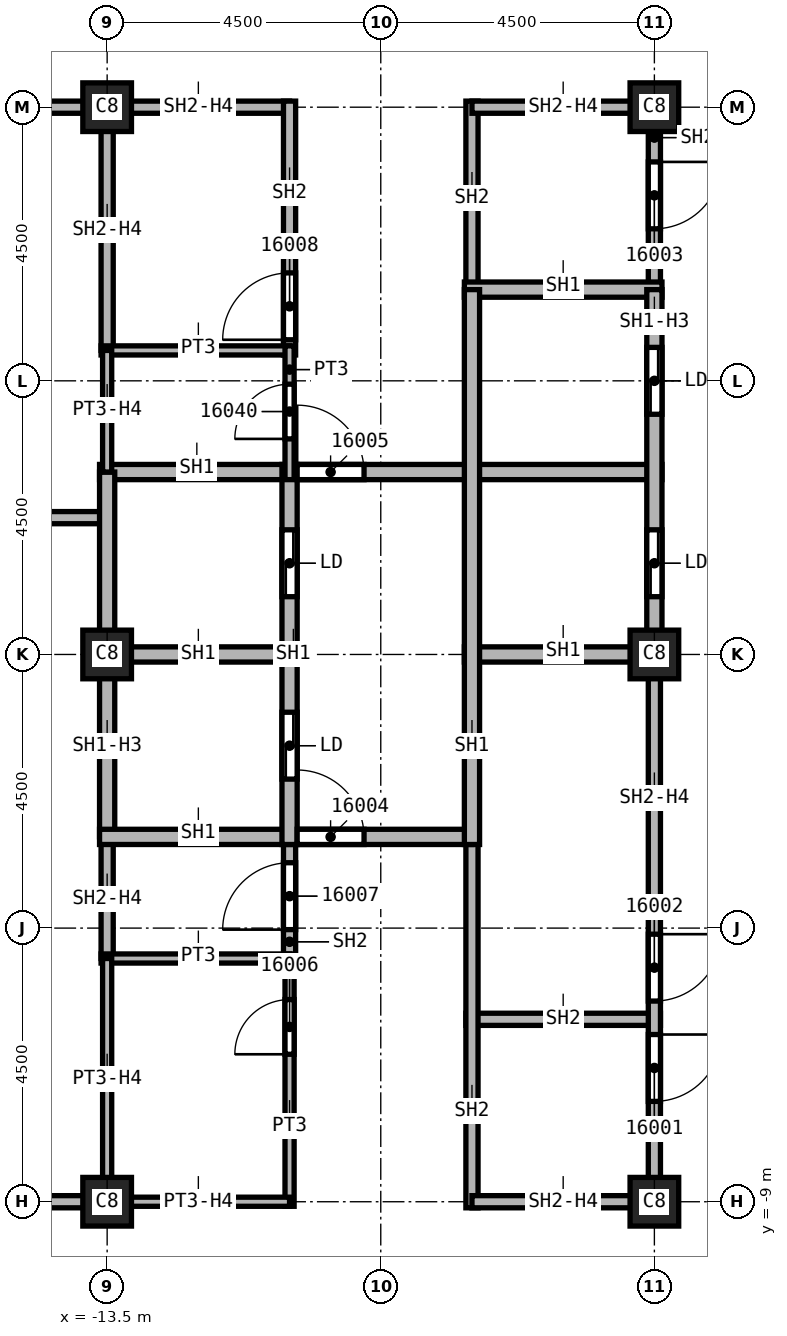
"""IFC4 building model, lengths in metres.
Left out: names, types, materials, properties, quantities, classifications, styles, units other than length and angle.
Written with IfcOpenShell. Run it as: python <this file> out.ifc"""

import sys

from ifc_helpers import new_model, si_unit, direction, frame, frame_2d, origin, origin_2d, place, context, subcontext, project, spatial, rectangle, extrude, element, fill, save


model = new_model("IFC4")
c1 = context("Model", 3, precision=1e-05, world=origin(), true_north=direction((0.0, 1.0)))
c2 = subcontext(c1, "Body", "Model", "MODEL_VIEW")
j1 = project(units=[si_unit("LENGTHUNIT", "METRE"), si_unit("PLANEANGLEUNIT", "RADIAN")], contexts=[c1])
p1 = place(None, origin())
s1 = spatial("IfcSite", under=j1, at=p1, CompositionType="ELEMENT")
p2 = place(p1, origin())
s2 = spatial("IfcBuilding", under=s1, at=p2, CompositionType="ELEMENT")
p3 = place(p2, frame((0.0, 0.0, 246.0)))
s3 = spatial("IfcBuildingStorey", under=s2, at=p3, CompositionType="ELEMENT", Elevation=246.0)
for number, where, z_axis, x_axis in (
    (1, (-4.5, 0.0, 0.0), (0.0, 0.0, 1.0), (1.0, 0.0, 0.0)),
    (2, (-4.5, 9.0, 0.0), (0.0, 0.0, 1.0), (1.0, 0.0, 0.0)),
    (3, (-4.5, -9.0, 0.0), (0.0, 0.0, 1.0), (1.0, 0.0, 0.0)),
    (4, (-13.5, 0.0, 0.0), (0.0, 0.0, 1.0), (1.0, 0.0, 0.0)),
    (5, (-13.5, 9.0, 0.0), (0.0, 0.0, 1.0), (1.0, 0.0, 0.0)),
    (6, (-13.5, -9.0, 0.0), (0.0, 0.0, 1.0), (1.0, 0.0, 0.0)),
):
    element("IfcColumn", number, at=place(p3, frame(where, z_axis=z_axis, x_axis=x_axis)), inside=s3, PredefinedType="COLUMN", context=c2, shape_type="SweptSolid", body=[
        extrude(rectangle(XDim=0.8, YDim=0.8, at=origin_2d()), origin(), (0.0, 0.0, 1.0), 3.72),
    ])
for number, where, z_axis, x_axis in (
    (7, (-18.0, -9.0, 0.0), (0.0, 0.0, 1.0), (1.0, 0.0, 0.0)),
    (8, (-18.0, 2.25, 0.0), (0.0, 0.0, 1.0), (1.0, 0.0, 0.0)),
    (9, (-13.5, 9.0, 0.0), (0.0, 0.0, 1.0), (-1.0, 0.0, 0.0)),
):
    element("IfcWall", number, at=place(p3, frame(where, z_axis=z_axis, x_axis=x_axis)), inside=s3, PredefinedType="PARTITIONING", context=c2, shape_type="SweptSolid", body=[
        extrude(rectangle(XDim=4.5, YDim=0.2, at=frame_2d((2.25, 0.0))), origin(), (0.0, 0.0, 1.0), 3.72),
    ])
p4 = place(p3, frame((-13.6, 9.0, 0.0), z_axis=(0.0, 0.0, 1.0), x_axis=(1.0, 0.0, 0.0)))
e10 = element("IfcWall", 10, at=p4, inside=s3, PredefinedType="SOLIDWALL", context=c2, shape_type="SweptSolid", body=[
    extrude(rectangle(XDim=3.1, YDim=0.2, at=frame_2d((1.55, 0.0))), origin(), (0.0, 0.0, 1.0), 3.042),
])
p5 = place(p3, frame((-13.5, -5.0, 0.0), z_axis=(0.0, 0.0, 1.0), x_axis=(0.0, 1.0, 0.0)))
e11 = element("IfcWall", 11, at=p5, inside=s3, PredefinedType="SOLIDWALL", context=c2, shape_type="SweptSolid", body=[
    extrude(rectangle(XDim=2.0, YDim=0.2, at=frame_2d((1.0, 0.0))), origin(), (0.0, 0.0, 1.0), 3.042),
])
p6 = place(p3, frame((-13.5, 5.0, 0.0), z_axis=(0.0, 0.0, 1.0), x_axis=(0.0, 1.0, 0.0)))
e12 = element("IfcWall", 12, at=p6, inside=s3, PredefinedType="SOLIDWALL", context=c2, shape_type="SweptSolid", body=[
    extrude(rectangle(XDim=4.1, YDim=0.2, at=frame_2d((2.05, 0.0))), origin(), (0.0, 0.0, 1.0), 3.042),
])
p7 = place(p3, frame((-10.5, -5.075, 0.0), z_axis=(0.0, 0.0, 1.0), x_axis=(0.0, 1.0, 0.0)))
e13 = element("IfcWall", 13, at=p7, inside=s3, PredefinedType="SOLIDWALL", context=c2, shape_type="SweptSolid", body=[
    extrude(rectangle(XDim=2.2, YDim=0.2, at=frame_2d((1.1, 0.0))), origin(), (0.0, 0.0, 1.0), 3.72),
])
p8 = place(p7, frame((0.55, 0.0, 0.0)))
e14 = element("IfcOpeningElement", 14, at=p8, cuts=e13, PredefinedType="OPENING", context=c2, shape_type="SweptSolid", body=[
    extrude(rectangle(XDim=1.1, YDim=2.1, at=frame_2d((0.55, 1.05))), frame((0.0, 0.1, 0.0), z_axis=(0.0, -1.0, 0.0), x_axis=(1.0, 0.0, 0.0)), (0.0, 0.0, 1.0), 0.2),
])
p9 = place(p3, frame((-10.5, 4.925, 0.0), z_axis=(0.0, 0.0, 1.0), x_axis=(0.0, 1.0, 0.0)))
e15 = element("IfcWall", 15, at=p9, inside=s3, PredefinedType="SOLIDWALL", context=c2, shape_type="SweptSolid", body=[
    extrude(rectangle(XDim=4.175, YDim=0.2, at=frame_2d((2.087, 0.0))), origin(), (0.0, 0.0, 1.0), 3.72),
])
p10 = place(p9, frame((0.25, 0.0, 0.0)))
e16 = element("IfcOpeningElement", 16, at=p10, cuts=e15, PredefinedType="OPENING", context=c2, shape_type="SweptSolid", body=[
    extrude(rectangle(XDim=1.1, YDim=2.1, at=frame_2d((0.55, 1.05))), frame((0.0, 0.1, 0.0), z_axis=(0.0, -1.0, 0.0), x_axis=(1.0, 0.0, 0.0)), (0.0, 0.0, 1.0), 0.2),
])
p11 = place(p3, frame((-7.6, -6.0, 0.0), z_axis=(0.0, 0.0, 1.0), x_axis=(1.0, 0.0, 0.0)))
e17 = element("IfcWall", 17, at=p11, inside=s3, PredefinedType="SOLIDWALL", context=c2, shape_type="SweptSolid", body=[
    extrude(rectangle(XDim=3.2, YDim=0.2, at=frame_2d((1.6, 0.0))), origin(), (0.0, 0.0, 1.0), 3.72),
])
p12 = place(p3, frame((-7.5, -9.1, 0.0), z_axis=(0.0, 0.0, 1.0), x_axis=(0.0, 1.0, 0.0)))
e18 = element("IfcWall", 18, at=p12, inside=s3, PredefinedType="SOLIDWALL", context=c2, shape_type="SweptSolid", body=[
    extrude(rectangle(XDim=6.225, YDim=0.2, at=frame_2d((3.113, 0.0))), origin(), (0.0, 0.0, 1.0), 3.72),
])
p13 = place(p3, frame((-7.5, 6.0, 0.0), z_axis=(0.0, 0.0, 1.0), x_axis=(0.0, 1.0, 0.0)))
e19 = element("IfcWall", 19, at=p13, inside=s3, PredefinedType="SOLIDWALL", context=c2, shape_type="SweptSolid", body=[
    extrude(rectangle(XDim=3.1, YDim=0.2, at=frame_2d((1.55, 0.0))), origin(), (0.0, 0.0, 1.0), 3.72),
])
for number, where, z_axis, x_axis in (
    (20, (-7.5, 9.0, 0.0), (0.0, 0.0, 1.0), (1.0, 0.0, 0.0)),
    (21, (-4.5, -9.0, 0.0), (0.0, 0.0, 1.0), (-1.0, 0.0, 0.0)),
):
    element("IfcWall", number, at=place(p3, frame(where, z_axis=z_axis, x_axis=x_axis)), inside=s3, PredefinedType="SOLIDWALL", context=c2, shape_type="SweptSolid", body=[
        extrude(rectangle(XDim=3.0, YDim=0.2, at=frame_2d((1.5, 0.0))), origin(), (0.0, 0.0, 1.0), 3.042),
    ])
p14 = place(p3, frame((-4.5, 0.0, 0.0), z_axis=(0.0, 0.0, 1.0), x_axis=(0.0, -1.0, 0.0)))
e22 = element("IfcWall", 22, at=p14, inside=s3, PredefinedType="SOLIDWALL", context=c2, shape_type="SweptSolid", body=[
    extrude(rectangle(XDim=9.1, YDim=0.2, at=frame_2d((4.55, 0.0))), origin(), (0.0, 0.0, 1.0), 3.042),
])
p15 = place(p14, frame((6.25, 0.0, 0.0)))
e23 = element("IfcOpeningElement", 23, at=p15, cuts=e22, PredefinedType="OPENING", context=c2, shape_type="SweptSolid", body=[
    extrude(rectangle(XDim=1.1, YDim=2.1, at=frame_2d((0.55, 1.05))), frame((0.0, 0.1, 0.0), z_axis=(0.0, -1.0, 0.0), x_axis=(1.0, 0.0, 0.0)), (0.0, 0.0, 1.0), 0.2),
])
p16 = place(p14, frame((4.6, 0.0, 0.0)))
e24 = element("IfcOpeningElement", 24, at=p16, cuts=e22, PredefinedType="OPENING", context=c2, shape_type="SweptSolid", body=[
    extrude(rectangle(XDim=1.1, YDim=2.1, at=frame_2d((0.55, 1.05))), frame((0.0, 0.1, 0.0), z_axis=(0.0, -1.0, 0.0), x_axis=(1.0, 0.0, 0.0)), (0.0, 0.0, 1.0), 0.2),
])
p17 = place(p3, frame((-4.5, 9.1, 0.0), z_axis=(0.0, 0.0, 1.0), x_axis=(0.0, -1.0, 0.0)))
e25 = element("IfcWall", 25, at=p17, inside=s3, PredefinedType="SOLIDWALL", context=c2, shape_type="SweptSolid", body=[
    extrude(rectangle(XDim=3.1, YDim=0.2, at=frame_2d((1.55, 0.0))), origin(), (0.0, 0.0, 1.0), 3.042),
])
p18 = place(p17, frame((1.0, 0.0, 0.0)))
e26 = element("IfcOpeningElement", 26, at=p18, cuts=e25, PredefinedType="OPENING", context=c2, shape_type="SweptSolid", body=[
    extrude(rectangle(XDim=1.1, YDim=2.1, at=frame_2d((0.55, 1.05))), frame((0.0, 0.1, 0.0), z_axis=(0.0, -1.0, 0.0), x_axis=(1.0, 0.0, 0.0)), (0.0, 0.0, 1.0), 0.2),
])
p19 = place(p3, frame((-13.625, 0.0, 0.0), z_axis=(0.0, 0.0, 1.0), x_axis=(1.0, 0.0, 0.0)))
e27 = element("IfcWall", 27, at=p19, inside=s3, PredefinedType="SOLIDWALL", context=c2, shape_type="SweptSolid", body=[
    extrude(rectangle(XDim=3.125, YDim=0.25, at=frame_2d((1.562, 0.0))), origin(), (0.0, 0.0, 1.0), 3.72),
])
p20 = place(p3, frame((-13.625, 3.0, 0.0), z_axis=(0.0, 0.0, 1.0), x_axis=(1.0, 0.0, 0.0)))
e28 = element("IfcWall", 28, at=p20, inside=s3, PredefinedType="SOLIDWALL", context=c2, shape_type="SweptSolid", body=[
    extrude(rectangle(XDim=9.25, YDim=0.25, at=frame_2d((4.625, 0.0))), origin(), (0.0, 0.0, 1.0), 3.72),
])
p21 = place(p20, frame((3.25, 0.0, 0.0)))
e29 = element("IfcOpeningElement", 29, at=p21, cuts=e28, PredefinedType="OPENING", context=c2, shape_type="SweptSolid", body=[
    extrude(rectangle(XDim=1.1, YDim=2.1, at=frame_2d((0.55, 1.05))), frame((0.0, 0.125, 0.0), z_axis=(0.0, -1.0, 0.0), x_axis=(1.0, 0.0, 0.0)), (0.0, 0.0, 1.0), 0.25),
])
p22 = place(p3, frame((-13.5, -3.0, 0.0), z_axis=(0.0, 0.0, 1.0), x_axis=(0.0, 1.0, 0.0)))
e30 = element("IfcWall", 30, at=p22, inside=s3, PredefinedType="SOLIDWALL", context=c2, shape_type="SweptSolid", body=[
    extrude(rectangle(XDim=6.0, YDim=0.25, at=frame_2d((3.0, 0.0))), origin(), (0.0, 0.0, 1.0), 3.042),
])
p23 = place(p3, frame((-13.625, -3.0, 0.0), z_axis=(0.0, 0.0, 1.0), x_axis=(1.0, 0.0, 0.0)))
e31 = element("IfcWall", 31, at=p23, inside=s3, PredefinedType="SOLIDWALL", context=c2, shape_type="SweptSolid", body=[
    extrude(rectangle(XDim=6.125, YDim=0.25, at=frame_2d((3.062, 0.0))), origin(), (0.0, 0.0, 1.0), 3.72),
])
p24 = place(p23, frame((3.25, 0.0, 0.0)))
e32 = element("IfcOpeningElement", 32, at=p24, cuts=e31, PredefinedType="OPENING", context=c2, shape_type="SweptSolid", body=[
    extrude(rectangle(XDim=1.1, YDim=2.1, at=frame_2d((0.55, 1.05))), frame((0.0, 0.125, 0.0), z_axis=(0.0, -1.0, 0.0), x_axis=(1.0, 0.0, 0.0)), (0.0, 0.0, 1.0), 0.25),
])
p25 = place(p3, frame((-10.5, -3.125, 0.0), z_axis=(0.0, 0.0, 1.0), x_axis=(0.0, 1.0, 0.0)))
e33 = element("IfcWall", 33, at=p25, inside=s3, PredefinedType="SOLIDWALL", context=c2, shape_type="SweptSolid", body=[
    extrude(rectangle(XDim=6.25, YDim=0.25, at=frame_2d((3.125, 0.0))), origin(), (0.0, 0.0, 1.0), 3.72),
])
p26 = place(p25, frame((1.075, 0.0, 0.0)))
e34 = element("IfcOpeningElement", 34, at=p26, cuts=e33, PredefinedType="OPENING", context=c2, shape_type="SweptSolid", body=[
    extrude(rectangle(XDim=1.1, YDim=2.1, at=frame_2d((0.55, 1.05))), frame((0.0, 0.125, 0.0), z_axis=(0.0, -1.0, 0.0), x_axis=(1.0, 0.0, 0.0)), (0.0, 0.0, 1.0), 0.25),
])
p27 = place(p25, frame((4.075, 0.0, 0.0)))
e35 = element("IfcOpeningElement", 35, at=p27, cuts=e33, PredefinedType="OPENING", context=c2, shape_type="SweptSolid", body=[
    extrude(rectangle(XDim=1.1, YDim=2.1, at=frame_2d((0.55, 1.05))), frame((0.0, 0.125, 0.0), z_axis=(0.0, -1.0, 0.0), x_axis=(1.0, 0.0, 0.0)), (0.0, 0.0, 1.0), 0.25),
])
for number, where, z_axis, x_axis in (
    (36, (-7.625, 0.0, 0.0), (0.0, 0.0, 1.0), (1.0, 0.0, 0.0)),
    (37, (-7.625, 6.0, 0.0), (0.0, 0.0, 1.0), (1.0, 0.0, 0.0)),
):
    element("IfcWall", number, at=place(p3, frame(where, z_axis=z_axis, x_axis=x_axis)), inside=s3, PredefinedType="SOLIDWALL", context=c2, shape_type="SweptSolid", body=[
        extrude(rectangle(XDim=3.25, YDim=0.25, at=frame_2d((1.625, 0.0))), origin(), (0.0, 0.0, 1.0), 3.72),
    ])
p28 = place(p3, frame((-7.5, -3.125, 0.0), z_axis=(0.0, 0.0, 1.0), x_axis=(0.0, 1.0, 0.0)))
e38 = element("IfcWall", 38, at=p28, inside=s3, PredefinedType="SOLIDWALL", context=c2, shape_type="SweptSolid", body=[
    extrude(rectangle(XDim=9.125, YDim=0.25, at=frame_2d((4.562, 0.0))), origin(), (0.0, 0.0, 1.0), 3.72),
])
p29 = place(p3, frame((-4.5, 6.0, 0.0), z_axis=(0.0, 0.0, 1.0), x_axis=(0.0, -1.0, 0.0)))
e39 = element("IfcWall", 39, at=p29, inside=s3, PredefinedType="SOLIDWALL", context=c2, shape_type="SweptSolid", body=[
    extrude(rectangle(XDim=6.0, YDim=0.25, at=frame_2d((3.0, 0.0))), origin(), (0.0, 0.0, 1.0), 3.042),
])
p30 = place(p29, frame((3.95, 0.0, 0.0)))
e40 = element("IfcOpeningElement", 40, at=p30, cuts=e39, PredefinedType="OPENING", context=c2, shape_type="SweptSolid", body=[
    extrude(rectangle(XDim=1.1, YDim=2.1, at=frame_2d((0.55, 1.05))), frame((0.0, 0.125, 0.0), z_axis=(0.0, -1.0, 0.0), x_axis=(1.0, 0.0, 0.0)), (0.0, 0.0, 1.0), 0.25),
])
p31 = place(p29, frame((0.95, 0.0, 0.0)))
e41 = element("IfcOpeningElement", 41, at=p31, cuts=e39, PredefinedType="OPENING", context=c2, shape_type="SweptSolid", body=[
    extrude(rectangle(XDim=1.1, YDim=2.1, at=frame_2d((0.55, 1.05))), frame((0.0, 0.125, 0.0), z_axis=(0.0, -1.0, 0.0), x_axis=(1.0, 0.0, 0.0)), (0.0, 0.0, 1.0), 0.25),
])
for number, where, z_axis, x_axis in (
    (42, (-13.6, -5.0, 0.0), (0.0, 0.0, 1.0), (1.0, 0.0, 0.0)),
    (43, (-13.6, 5.0, 0.0), (0.0, 0.0, 1.0), (1.0, 0.0, 0.0)),
):
    element("IfcWall", number, at=place(p3, frame(where, z_axis=z_axis, x_axis=x_axis)), inside=s3, PredefinedType="PARTITIONING", context=c2, shape_type="SweptSolid", body=[
        extrude(rectangle(XDim=3.1, YDim=0.15, at=frame_2d((1.55, 0.0))), origin(), (0.0, 0.0, 1.0), 3.72),
    ])
p32 = place(p3, frame((-13.5, -9.1, 0.0), z_axis=(0.0, 0.0, 1.0), x_axis=(0.0, 1.0, 0.0)))
e44 = element("IfcWall", 44, at=p32, inside=s3, PredefinedType="PARTITIONING", context=c2, shape_type="SweptSolid", body=[
    extrude(rectangle(XDim=4.1, YDim=0.15, at=frame_2d((2.05, 0.0))), origin(), (0.0, 0.0, 1.0), 3.042),
])
p33 = place(p3, frame((-13.5, 3.0, 0.0), z_axis=(0.0, 0.0, 1.0), x_axis=(0.0, 1.0, 0.0)))
e45 = element("IfcWall", 45, at=p33, inside=s3, PredefinedType="PARTITIONING", context=c2, shape_type="SweptSolid", body=[
    extrude(rectangle(XDim=2.0, YDim=0.15, at=frame_2d((1.0, 0.0))), origin(), (0.0, 0.0, 1.0), 3.042),
])
p34 = place(p3, frame((-10.5, -9.075, 0.0), z_axis=(0.0, 0.0, 1.0), x_axis=(0.0, 1.0, 0.0)))
e46 = element("IfcWall", 46, at=p34, inside=s3, PredefinedType="PARTITIONING", context=c2, shape_type="SweptSolid", body=[
    extrude(rectangle(XDim=4.15, YDim=0.15, at=frame_2d((2.075, 0.0))), origin(), (0.0, 0.0, 1.0), 3.72),
])
p35 = place(p34, frame((2.5, 0.0, 0.0)))
e47 = element("IfcOpeningElement", 47, at=p35, cuts=e46, PredefinedType="OPENING", context=c2, shape_type="SweptSolid", body=[
    extrude(rectangle(XDim=0.9, YDim=2.1, at=frame_2d((0.45, 1.05))), frame((0.0, 0.075, 0.0), z_axis=(0.0, -1.0, 0.0), x_axis=(1.0, 0.0, 0.0)), (0.0, 0.0, 1.0), 0.15),
])
p36 = place(p3, frame((-10.5, -9.0, 0.0), z_axis=(0.0, 0.0, 1.0), x_axis=(-1.0, 0.0, 0.0)))
e48 = element("IfcWall", 48, at=p36, inside=s3, PredefinedType="PARTITIONING", context=c2, shape_type="SweptSolid", body=[
    extrude(rectangle(XDim=3.075, YDim=0.15, at=frame_2d((1.538, 0.0))), origin(), (0.0, 0.0, 1.0), 3.042),
])
p37 = place(p3, frame((-10.5, 2.875, 0.0), z_axis=(0.0, 0.0, 1.0), x_axis=(0.0, 1.0, 0.0)))
e49 = element("IfcWall", 49, at=p37, inside=s3, PredefinedType="PARTITIONING", context=c2, shape_type="SweptSolid", body=[
    extrude(rectangle(XDim=2.2, YDim=0.15, at=frame_2d((1.1, 0.0))), origin(), (0.0, 0.0, 1.0), 3.72),
])
p38 = place(p37, frame((0.67, 0.0, 0.0)))
e50 = element("IfcOpeningElement", 50, at=p38, cuts=e49, PredefinedType="OPENING", context=c2, shape_type="SweptSolid", body=[
    extrude(rectangle(XDim=0.9, YDim=2.1, at=frame_2d((0.45, 1.05))), frame((0.0, 0.075, 0.0), z_axis=(0.0, -1.0, 0.0), x_axis=(1.0, 0.0, 0.0)), (0.0, 0.0, 1.0), 0.15),
])
p39 = place(p15, origin())
e51 = element("IfcDoor", 51, at=p39, inside=s3, OperationType="SINGLE_SWING_RIGHT", PredefinedType="DOOR", context=c2, shape_type="SweptSolid", body=[
    extrude(rectangle(XDim=1.1, YDim=2.1, at=frame_2d((0.55, 1.05))), frame((0.0, 0.025, 0.0), z_axis=(0.0, -1.0, 0.0), x_axis=(1.0, 0.0, 0.0)), (0.0, 0.0, 1.0), 0.05),
])
fill(e23, e51)
p40 = place(p16, origin())
e52 = element("IfcDoor", 52, at=p40, inside=s3, OperationType="SINGLE_SWING_LEFT", PredefinedType="DOOR", context=c2, shape_type="SweptSolid", body=[
    extrude(rectangle(XDim=1.1, YDim=2.1, at=frame_2d((0.55, 1.05))), frame((0.0, 0.025, 0.0), z_axis=(0.0, -1.0, 0.0), x_axis=(1.0, 0.0, 0.0)), (0.0, 0.0, 1.0), 0.05),
])
fill(e24, e52)
p41 = place(p18, origin())
e53 = element("IfcDoor", 53, at=p41, inside=s3, OperationType="SINGLE_SWING_RIGHT", PredefinedType="DOOR", context=c2, shape_type="SweptSolid", body=[
    extrude(rectangle(XDim=1.1, YDim=2.1, at=frame_2d((0.55, 1.05))), frame((0.0, 0.025, 0.0), z_axis=(0.0, -1.0, 0.0), x_axis=(1.0, 0.0, 0.0)), (0.0, 0.0, 1.0), 0.05),
])
fill(e26, e53)
p42 = place(p24, origin())
e54 = element("IfcDoor", 54, at=p42, inside=s3, OperationType="SINGLE_SWING_LEFT", PredefinedType="DOOR", context=c2, shape_type="SweptSolid", body=[
    extrude(rectangle(XDim=1.1, YDim=2.1, at=frame_2d((0.55, 1.05))), frame((0.0, 0.025, 0.0), z_axis=(0.0, -1.0, 0.0), x_axis=(1.0, 0.0, 0.0)), (0.0, 0.0, 1.0), 0.05),
])
fill(e32, e54)
p43 = place(p21, origin())
e55 = element("IfcDoor", 55, at=p43, inside=s3, OperationType="SINGLE_SWING_RIGHT", PredefinedType="DOOR", context=c2, shape_type="SweptSolid", body=[
    extrude(rectangle(XDim=1.1, YDim=2.1, at=frame_2d((0.55, 1.05))), frame((0.0, 0.025, 0.0), z_axis=(0.0, -1.0, 0.0), x_axis=(1.0, 0.0, 0.0)), (0.0, 0.0, 1.0), 0.05),
])
fill(e29, e55)
p44 = place(p35, origin())
e56 = element("IfcDoor", 56, at=p44, inside=s3, OperationType="SINGLE_SWING_LEFT", PredefinedType="DOOR", context=c2, shape_type="SweptSolid", body=[
    extrude(rectangle(XDim=0.9, YDim=2.1, at=frame_2d((0.45, 1.05))), frame((0.0, 0.025, 0.0), z_axis=(0.0, -1.0, 0.0), x_axis=(1.0, 0.0, 0.0)), (0.0, 0.0, 1.0), 0.05),
])
fill(e47, e56)
p45 = place(p8, origin())
e57 = element("IfcDoor", 57, at=p45, inside=s3, OperationType="SINGLE_SWING_RIGHT", PredefinedType="DOOR", context=c2, shape_type="SweptSolid", body=[
    extrude(rectangle(XDim=1.1, YDim=2.1, at=frame_2d((0.55, 1.05))), frame((0.0, 0.025, 0.0), z_axis=(0.0, -1.0, 0.0), x_axis=(1.0, 0.0, 0.0)), (0.0, 0.0, 1.0), 0.05),
])
fill(e14, e57)
p46 = place(p10, origin())
e58 = element("IfcDoor", 58, at=p46, inside=s3, OperationType="SINGLE_SWING_LEFT", PredefinedType="DOOR", context=c2, shape_type="SweptSolid", body=[
    extrude(rectangle(XDim=1.1, YDim=2.1, at=frame_2d((0.55, 1.05))), frame((0.0, 0.025, 0.0), z_axis=(0.0, -1.0, 0.0), x_axis=(1.0, 0.0, 0.0)), (0.0, 0.0, 1.0), 0.05),
])
fill(e16, e58)
p47 = place(p38, origin())
e59 = element("IfcDoor", 59, at=p47, inside=s3, OperationType="SINGLE_SWING_LEFT", PredefinedType="DOOR", context=c2, shape_type="SweptSolid", body=[
    extrude(rectangle(XDim=0.9, YDim=2.1, at=frame_2d((0.45, 1.05))), frame((0.0, 0.025, 0.0), z_axis=(0.0, -1.0, 0.0), x_axis=(1.0, 0.0, 0.0)), (0.0, 0.0, 1.0), 0.05),
])
fill(e50, e59)
p48 = place(p30, origin())
e60 = element("IfcDoor", 60, at=p48, inside=s3, OperationType="SLIDING_TO_LEFT", PredefinedType="DOOR", context=c2, shape_type="SweptSolid", body=[
    extrude(rectangle(XDim=1.1, YDim=2.1, at=frame_2d((0.55, 1.05))), frame((0.0, 0.025, 0.0), z_axis=(0.0, -1.0, 0.0), x_axis=(1.0, 0.0, 0.0)), (0.0, 0.0, 1.0), 0.05),
])
fill(e40, e60)
p49 = place(p31, origin())
e61 = element("IfcDoor", 61, at=p49, inside=s3, OperationType="SLIDING_TO_LEFT", PredefinedType="DOOR", context=c2, shape_type="SweptSolid", body=[
    extrude(rectangle(XDim=1.1, YDim=2.1, at=frame_2d((0.55, 1.05))), frame((0.0, 0.025, 0.0), z_axis=(0.0, -1.0, 0.0), x_axis=(1.0, 0.0, 0.0)), (0.0, 0.0, 1.0), 0.05),
])
fill(e41, e61)
p50 = place(p26, origin())
e62 = element("IfcDoor", 62, at=p50, inside=s3, OperationType="SLIDING_TO_LEFT", PredefinedType="DOOR", context=c2, shape_type="SweptSolid", body=[
    extrude(rectangle(XDim=1.1, YDim=2.1, at=frame_2d((0.55, 1.05))), frame((0.0, 0.025, 0.0), z_axis=(0.0, -1.0, 0.0), x_axis=(1.0, 0.0, 0.0)), (0.0, 0.0, 1.0), 0.05),
])
fill(e34, e62)
p51 = place(p27, origin())
e63 = element("IfcDoor", 63, at=p51, inside=s3, OperationType="SLIDING_TO_LEFT", PredefinedType="DOOR", context=c2, shape_type="SweptSolid", body=[
    extrude(rectangle(XDim=1.1, YDim=2.1, at=frame_2d((0.55, 1.05))), frame((0.0, 0.025, 0.0), z_axis=(0.0, -1.0, 0.0), x_axis=(1.0, 0.0, 0.0)), (0.0, 0.0, 1.0), 0.05),
])
fill(e35, e63)
save(model, sys.argv[1])
